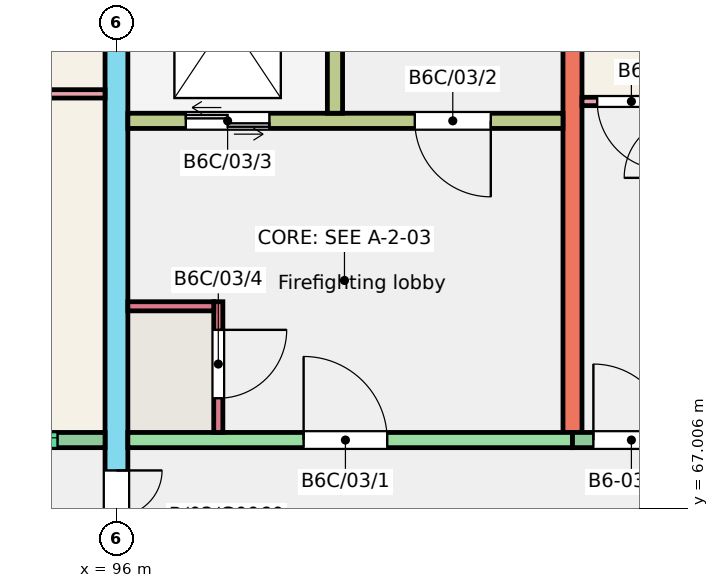
"""IFC4 building model, lengths in metres.
Left out: names, types, materials, properties, quantities, classifications, styles, units other than length and angle.
Written with IfcOpenShell. Run it as: python <this file> out.ifc"""

import sys

from ifc_helpers import new_model, si_unit, direction, frame, frame_2d, origin, place, context, subcontext, project, spatial, rectangle, extrude, element, fill, save


model = new_model("IFC4")
c1 = context("Model", 3, precision=1e-05, world=origin(), true_north=direction((0.0, 1.0)))
c2 = subcontext(c1, "Body", "Model", "MODEL_VIEW")
j1 = project(units=[si_unit("LENGTHUNIT", "METRE"), si_unit("PLANEANGLEUNIT", "RADIAN")], contexts=[c1])
p1 = place(None, origin())
s1 = spatial("IfcSite", under=j1, at=p1, CompositionType="ELEMENT")
p2 = place(p1, origin())
s2 = spatial("IfcBuilding", under=s1, at=p2, CompositionType="ELEMENT")
p3 = place(p2, frame((0.0, 0.0, 9.0)))
s3 = spatial("IfcBuildingStorey", under=s2, at=p3, CompositionType="ELEMENT", Elevation=9.0)
p4 = place(p3, frame((96.0, 66.0, 0.0), z_axis=(0.0, 0.0, 1.0), x_axis=(0.0, 1.0, 0.0)))
e1 = element("IfcWall", 1, at=p4, inside=s3, PredefinedType="SHEAR", context=c2, shape_type="SweptSolid", body=[
    extrude(rectangle(XDim=11.0, YDim=0.3, at=frame_2d((5.5, 0.0))), origin(), (0.0, 0.0, 1.0), 3.0),
])
p5 = place(p4, frame((0.3, 0.0, 0.0)))
e2 = element("IfcOpeningElement", 2, at=p5, cuts=e1, PredefinedType="OPENING", context=c2, shape_type="SweptSolid", body=[
    extrude(rectangle(XDim=1.2, YDim=2.1, at=frame_2d((0.6, 1.05))), frame((0.0, 0.16, 0.0), z_axis=(0.0, -1.0, 0.0), x_axis=(1.0, 0.0, 0.0)), (0.0, 0.0, 1.0), 0.32),
])
p6 = place(p3, frame((102.0, 68.0, 0.0), z_axis=(0.0, 0.0, 1.0), x_axis=(0.0, 1.0, 0.0)))
e3 = element("IfcWall", 3, at=p6, inside=s3, PredefinedType="SHEAR", context=c2, shape_type="SweptSolid", body=[
    extrude(rectangle(XDim=9.0, YDim=0.25, at=frame_2d((4.5, 0.0))), origin(), (0.0, 0.0, 1.0), 3.0),
])
p7 = place(p3, frame((92.4, 67.9, 0.0), z_axis=(0.0, 0.0, 1.0), x_axis=(1.0, 0.0, 0.0)))
e4 = element("IfcWall", 4, at=p7, inside=s3, PredefinedType="SOLIDWALL", context=c2, shape_type="SweptSolid", body=[
    extrude(rectangle(XDim=3.45, YDim=0.2, at=frame_2d((1.725, 0.0))), origin(), (0.0, 0.0, 1.0), 3.0),
])
p8 = place(p7, frame((0.725, 0.0, 1.2)))
e5 = element("IfcOpeningElement", 5, at=p8, cuts=e4, PredefinedType="OPENING", context=c2, shape_type="SweptSolid", body=[
    extrude(rectangle(XDim=2.1, YDim=1.2, at=frame_2d((1.05, 0.6))), frame((0.0, 0.11, 0.0), z_axis=(0.0, -1.0, 0.0), x_axis=(1.0, 0.0, 0.0)), (0.0, 0.0, 1.0), 0.22),
])
p9 = place(p3, frame((96.15, 67.9, 0.0), z_axis=(0.0, 0.0, 1.0), x_axis=(1.0, 0.0, 0.0)))
e6 = element("IfcWall", 6, at=p9, inside=s3, PredefinedType="SHEAR", context=c2, shape_type="SweptSolid", body=[
    extrude(rectangle(XDim=5.85, YDim=0.2, at=frame_2d((2.925, 0.0))), origin(), (0.0, 0.0, 1.0), 3.0),
])
p10 = place(p9, frame((2.312, 0.0, 0.0)))
e7 = element("IfcOpeningElement", 7, at=p10, cuts=e6, PredefinedType="OPENING", context=c2, shape_type="SweptSolid", body=[
    extrude(rectangle(XDim=1.1, YDim=2.1, at=frame_2d((0.55, 1.05))), frame((0.0, 0.11, 0.0), z_axis=(0.0, -1.0, 0.0), x_axis=(1.0, 0.0, 0.0)), (0.0, 0.0, 1.0), 0.22),
])
p11 = place(p3, frame((96.15, 72.1, 0.0), z_axis=(0.0, 0.0, 1.0), x_axis=(1.0, 0.0, 0.0)))
e8 = element("IfcWall", 8, at=p11, inside=s3, PredefinedType="SHEAR", context=c2, shape_type="SweptSolid", body=[
    extrude(rectangle(XDim=5.725, YDim=0.2, at=frame_2d((2.863, 0.0))), origin(), (0.0, 0.0, 1.0), 3.0),
])
p12 = place(p11, frame((3.775, 0.0, 0.0)))
e9 = element("IfcOpeningElement", 9, at=p12, cuts=e8, PredefinedType="OPENING", context=c2, shape_type="SweptSolid", body=[
    extrude(rectangle(XDim=1.0, YDim=2.1, at=frame_2d((0.5, 1.05))), frame((0.0, 0.11, 0.0), z_axis=(0.0, -1.0, 0.0), x_axis=(1.0, 0.0, 0.0)), (0.0, 0.0, 1.0), 0.22),
])
p13 = place(p11, frame((0.762, 0.0, 0.0)))
e10 = element("IfcOpeningElement", 10, at=p13, cuts=e8, PredefinedType="OPENING", context=c2, shape_type="SweptSolid", body=[
    extrude(rectangle(XDim=1.1, YDim=2.1, at=frame_2d((0.55, 1.05))), frame((0.0, 0.11, 0.0), z_axis=(0.0, -1.0, 0.0), x_axis=(1.0, 0.0, 0.0)), (0.0, 0.0, 1.0), 0.22),
])
p14 = place(p3, frame((98.875, 72.2, 0.0), z_axis=(0.0, 0.0, 1.0), x_axis=(0.0, 1.0, 0.0)))
e11 = element("IfcWall", 11, at=p14, inside=s3, PredefinedType="SHEAR", context=c2, shape_type="SweptSolid", body=[
    extrude(rectangle(XDim=4.8, YDim=0.2, at=frame_2d((2.4, 0.0))), origin(), (0.0, 0.0, 1.0), 3.0),
])
p15 = place(p3, frame((97.34, 68.0, 0.0), z_axis=(0.0, 0.0, 1.0), x_axis=(0.0, 1.0, 0.0)))
e12 = element("IfcWall", 12, at=p15, inside=s3, PredefinedType="SHEAR", context=c2, shape_type="SweptSolid", body=[
    extrude(rectangle(XDim=1.72, YDim=0.12, at=frame_2d((0.86, 0.0))), origin(), (0.0, 0.0, 1.0), 3.0),
])
p16 = place(p15, frame((0.45, 0.0, 0.0)))
e13 = element("IfcOpeningElement", 13, at=p16, cuts=e12, PredefinedType="OPENING", context=c2, shape_type="SweptSolid", body=[
    extrude(rectangle(XDim=0.9, YDim=2.1, at=frame_2d((0.45, 1.05))), frame((0.0, 0.07, 0.0), z_axis=(0.0, -1.0, 0.0), x_axis=(1.0, 0.0, 0.0)), (0.0, 0.0, 1.0), 0.14),
])
p17 = place(p3, frame((96.15, 69.66, 0.0), z_axis=(0.0, 0.0, 1.0), x_axis=(1.0, 0.0, 0.0)))
e14 = element("IfcWall", 14, at=p17, inside=s3, PredefinedType="SHEAR", context=c2, shape_type="SweptSolid", body=[
    extrude(rectangle(XDim=1.13, YDim=0.12, at=frame_2d((0.565, 0.0))), origin(), (0.0, 0.0, 1.0), 3.0),
])
p18 = place(p3, frame((102.0, 67.9, 0.0), z_axis=(0.0, 0.0, 1.0), x_axis=(1.0, 0.0, 0.0)))
e15 = element("IfcWall", 15, at=p18, inside=s3, PredefinedType="SOLIDWALL", context=c2, shape_type="SweptSolid", body=[
    extrude(rectangle(XDim=3.6, YDim=0.2, at=frame_2d((1.8, 0.0))), origin(), (0.0, 0.0, 1.0), 3.0),
])
p19 = place(p18, frame((1.917, 0.0, 1.1)))
e16 = element("IfcOpeningElement", 16, at=p19, cuts=e15, PredefinedType="OPENING", context=c2, shape_type="SweptSolid", body=[
    extrude(rectangle(XDim=1.2, YDim=1.3, at=frame_2d((0.6, 0.65))), frame((0.0, 0.11, 0.0), z_axis=(0.0, -1.0, 0.0), x_axis=(1.0, 0.0, 0.0)), (0.0, 0.0, 1.0), 0.22),
])
p20 = place(p18, frame((0.275, 0.0, 0.0)))
e17 = element("IfcOpeningElement", 17, at=p20, cuts=e15, PredefinedType="OPENING", context=c2, shape_type="SweptSolid", body=[
    extrude(rectangle(XDim=1.0, YDim=2.1, at=frame_2d((0.5, 1.05))), frame((0.0, 0.11, 0.0), z_axis=(0.0, -1.0, 0.0), x_axis=(1.0, 0.0, 0.0)), (0.0, 0.0, 1.0), 0.22),
])
p21 = place(p3, frame((92.5, 72.455, 0.0), z_axis=(0.0, 0.0, 1.0), x_axis=(1.0, 0.0, 0.0)))
e18 = element("IfcWall", 18, at=p21, inside=s3, PredefinedType="PARTITIONING", context=c2, shape_type="SweptSolid", body=[
    extrude(rectangle(XDim=3.35, YDim=0.11, at=frame_2d((1.675, 0.0))), origin(), (0.0, 0.0, 1.0), 2.8),
])
p22 = place(p3, frame((102.125, 72.355, 0.0), z_axis=(0.0, 0.0, 1.0), x_axis=(1.0, 0.0, 0.0)))
e19 = element("IfcWall", 19, at=p22, inside=s3, PredefinedType="PARTITIONING", context=c2, shape_type="SweptSolid", body=[
    extrude(rectangle(XDim=3.375, YDim=0.11, at=frame_2d((1.688, 0.0))), origin(), (0.0, 0.0, 1.0), 2.8),
])
p23 = place(p22, frame((0.2, 0.0, 0.0)))
e20 = element("IfcOpeningElement", 20, at=p23, cuts=e19, PredefinedType="OPENING", context=c2, shape_type="SweptSolid", body=[
    extrude(rectangle(XDim=0.9, YDim=2.1, at=frame_2d((0.45, 1.05))), frame((0.0, 0.065, 0.0), z_axis=(0.0, -1.0, 0.0), x_axis=(1.0, 0.0, 0.0)), (0.0, 0.0, 1.0), 0.13),
])
p24 = place(p8, origin())
e21 = element("IfcWindow", 21, at=p24, inside=s3, PartitioningType="SINGLE_PANEL", PredefinedType="WINDOW", context=c2, shape_type="SweptSolid", body=[
    extrude(rectangle(XDim=2.1, YDim=1.2, at=frame_2d((1.05, 0.6))), frame((0.0, 0.06, 0.0), z_axis=(0.0, -1.0, 0.0), x_axis=(1.0, 0.0, 0.0)), (0.0, 0.0, 1.0), 0.06),
])
fill(e5, e21)
p25 = place(p20, origin())
e22 = element("IfcDoor", 22, at=p25, inside=s3, OperationType="SINGLE_SWING_LEFT", PredefinedType="DOOR", context=c2, shape_type="SweptSolid", body=[
    extrude(rectangle(XDim=1.0, YDim=2.1, at=frame_2d((0.5, 1.05))), frame((0.0, 0.025, 0.0), z_axis=(0.0, -1.0, 0.0), x_axis=(1.0, 0.0, 0.0)), (0.0, 0.0, 1.0), 0.05),
])
fill(e17, e22)
p26 = place(p23, origin())
e23 = element("IfcDoor", 23, at=p26, inside=s3, OperationType="SINGLE_SWING_RIGHT", PredefinedType="DOOR", context=c2, shape_type="SweptSolid", body=[
    extrude(rectangle(XDim=0.9, YDim=2.1, at=frame_2d((0.45, 1.05))), frame((0.0, 0.025, 0.0), z_axis=(0.0, -1.0, 0.0), x_axis=(1.0, 0.0, 0.0)), (0.0, 0.0, 1.0), 0.05),
])
fill(e20, e23)
p27 = place(p10, origin())
e24 = element("IfcDoor", 24, at=p27, inside=s3, OperationType="SINGLE_SWING_LEFT", PredefinedType="DOOR", context=c2, shape_type="SweptSolid", body=[
    extrude(rectangle(XDim=1.1, YDim=2.1, at=frame_2d((0.55, 1.05))), frame((0.0, 0.025, 0.0), z_axis=(0.0, -1.0, 0.0), x_axis=(1.0, 0.0, 0.0)), (0.0, 0.0, 1.0), 0.05),
])
fill(e7, e24)
p28 = place(p12, origin())
e25 = element("IfcDoor", 25, at=p28, inside=s3, OperationType="SINGLE_SWING_RIGHT", PredefinedType="DOOR", context=c2, shape_type="SweptSolid", body=[
    extrude(rectangle(XDim=1.0, YDim=2.1, at=frame_2d((0.5, 1.05))), frame((0.0, 0.025, 0.0), z_axis=(0.0, -1.0, 0.0), x_axis=(1.0, 0.0, 0.0)), (0.0, 0.0, 1.0), 0.05),
])
fill(e9, e25)
p29 = place(p13, origin())
e26 = element("IfcDoor", 26, at=p29, inside=s3, OperationType="DOUBLE_DOOR_SLIDING", PredefinedType="DOOR", context=c2, shape_type="SweptSolid", body=[
    extrude(rectangle(XDim=1.1, YDim=2.1, at=frame_2d((0.55, 1.05))), frame((0.0, 0.025, 0.0), z_axis=(0.0, -1.0, 0.0), x_axis=(1.0, 0.0, 0.0)), (0.0, 0.0, 1.0), 0.05),
])
fill(e10, e26)
p30 = place(p16, origin())
e27 = element("IfcDoor", 27, at=p30, inside=s3, OperationType="SINGLE_SWING_RIGHT", PredefinedType="DOOR", context=c2, shape_type="SweptSolid", body=[
    extrude(rectangle(XDim=0.9, YDim=2.1, at=frame_2d((0.45, 1.05))), frame((0.0, 0.025, 0.0), z_axis=(0.0, -1.0, 0.0), x_axis=(1.0, 0.0, 0.0)), (0.0, 0.0, 1.0), 0.05),
])
fill(e13, e27)
p31 = place(p5, origin())
e28 = element("IfcDoor", 28, at=p31, inside=s3, OperationType="DOUBLE_DOOR_SINGLE_SWING", PredefinedType="DOOR", context=c2, shape_type="SweptSolid", body=[
    extrude(rectangle(XDim=1.2, YDim=2.1, at=frame_2d((0.6, 1.05))), frame((0.0, 0.025, 0.0), z_axis=(0.0, -1.0, 0.0), x_axis=(1.0, 0.0, 0.0)), (0.0, 0.0, 1.0), 0.05),
])
fill(e2, e28)
save(model, sys.argv[1])
